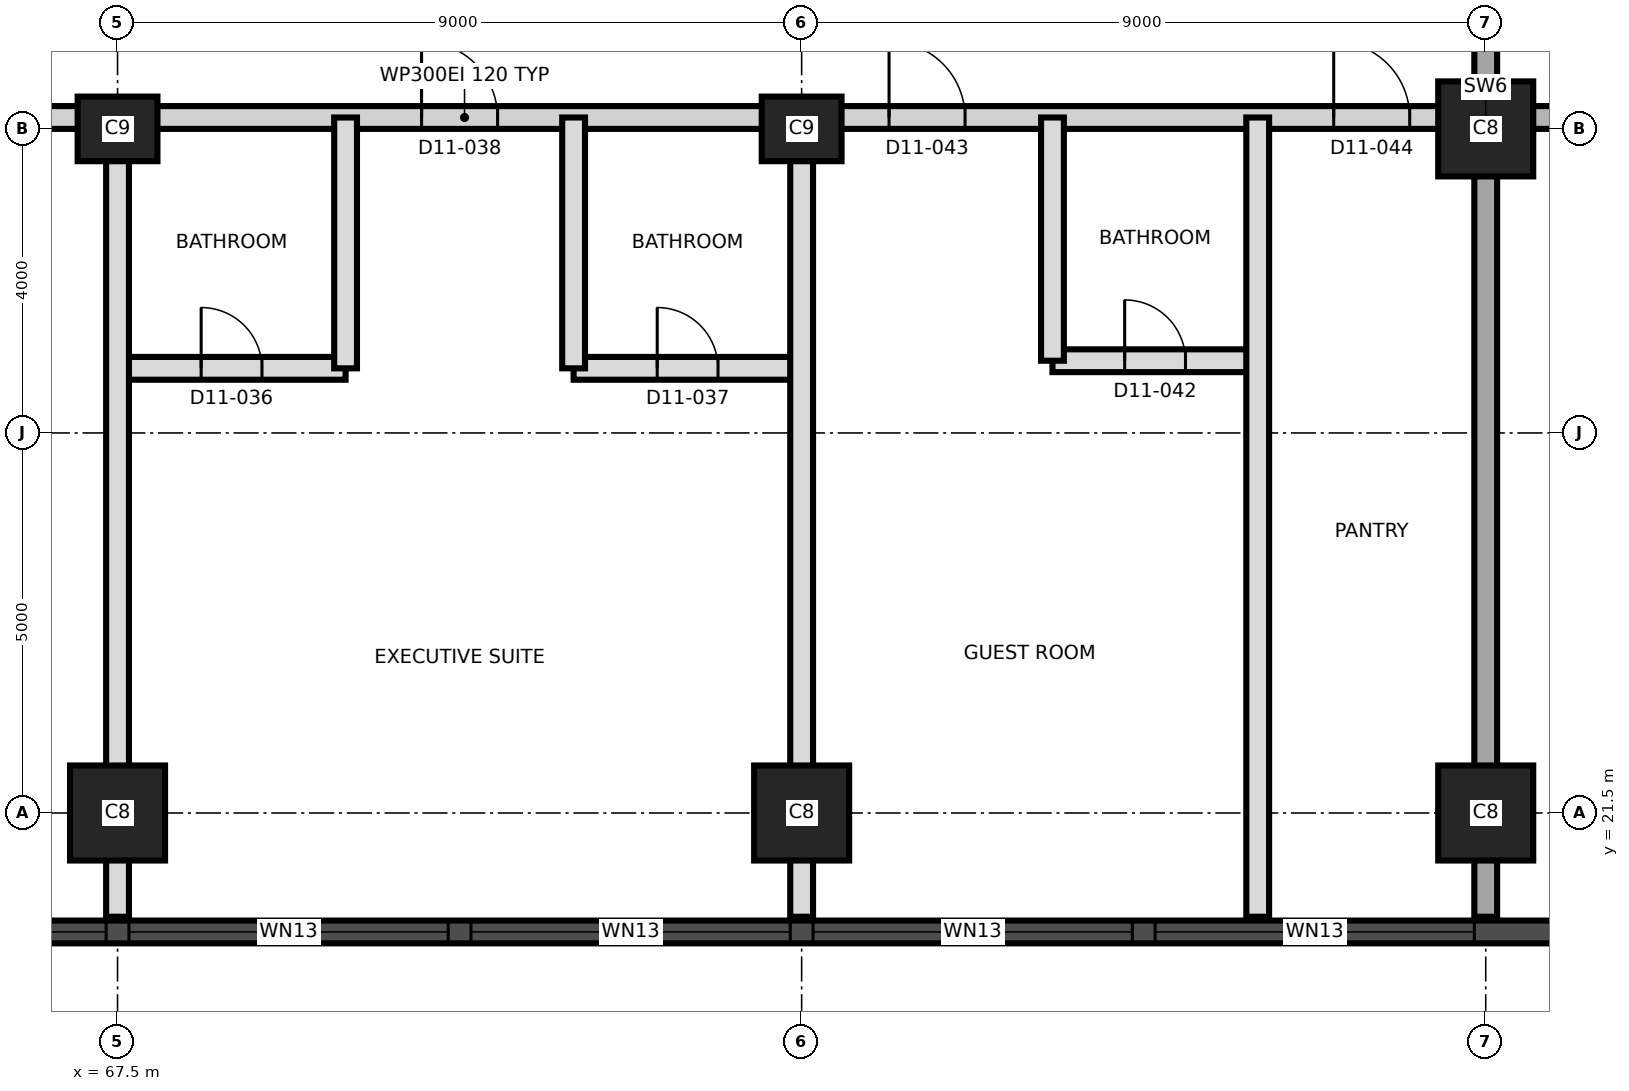
"""IFC4 building model, lengths in metres.
Left out: names, types, materials, properties, quantities, classifications, styles, units other than length and angle.
Written with IfcOpenShell. Run it as: python <this file> out.ifc"""

import sys

from ifc_helpers import new_model, si_unit, direction, frame, frame_2d, origin, origin_2d, place, context, subcontext, project, spatial, rectangle, extrude, element, fill, save


model = new_model("IFC4")
c1 = context("Model", 3, precision=1e-05, world=origin(), true_north=direction((0.0, 1.0)))
c2 = subcontext(c1, "Body", "Model", "MODEL_VIEW")
j1 = project(units=[si_unit("LENGTHUNIT", "METRE"), si_unit("PLANEANGLEUNIT", "RADIAN")], contexts=[c1])
p1 = place(None, origin())
s1 = spatial("IfcSite", under=j1, at=p1, CompositionType="ELEMENT")
p2 = place(p1, origin())
s2 = spatial("IfcBuilding", under=s1, at=p2, CompositionType="ELEMENT")
p3 = place(p2, frame((0.0, 0.0, 124.1)))
s3 = spatial("IfcBuildingStorey", under=s2, at=p3, CompositionType="ELEMENT", Elevation=124.1)
for number, where, z_axis, x_axis in (
    (1, (67.5, 21.5, 0.0), (0.0, 0.0, 1.0), (1.0, 0.0, 0.0)),
    (2, (76.5, 21.5, 0.0), (0.0, 0.0, 1.0), (1.0, 0.0, 0.0)),
    (3, (85.5, 21.5, 0.0), (0.0, 0.0, 1.0), (1.0, 0.0, 0.0)),
):
    element("IfcColumn", number, at=place(p3, frame(where, z_axis=z_axis, x_axis=x_axis)), inside=s3, PredefinedType="COLUMN", context=c2, shape_type="SweptSolid", body=[
        extrude(rectangle(XDim=1.25, YDim=1.25, at=origin_2d()), origin(), (0.0, 0.0, 1.0), 3.7),
    ])
for number, where, z_axis, x_axis in (
    (4, (67.5, 30.5, 0.0), (0.0, 0.0, 1.0), (1.0, 0.0, 0.0)),
    (5, (76.5, 30.5, 0.0), (0.0, 0.0, 1.0), (1.0, 0.0, 0.0)),
):
    element("IfcColumn", number, at=place(p3, frame(where, z_axis=z_axis, x_axis=x_axis)), inside=s3, PredefinedType="COLUMN", context=c2, shape_type="SweptSolid", body=[
        extrude(rectangle(XDim=1.05, YDim=0.85, at=origin_2d()), origin(), (0.0, 0.0, 1.0), 3.7),
    ])
p4 = place(p3, frame((85.5, 30.5, 0.0), z_axis=(0.0, 0.0, 1.0), x_axis=(1.0, 0.0, 0.0)))
e6 = element("IfcColumn", 6, at=p4, inside=s3, PredefinedType="COLUMN", context=c2, shape_type="SweptSolid", body=[
    extrude(rectangle(XDim=1.25, YDim=1.25, at=origin_2d()), origin(), (0.0, 0.0, 1.0), 3.7),
])
p5 = place(p3, frame((85.5, 20.135, 0.0), z_axis=(0.0, 0.0, 1.0), x_axis=(0.0, 1.0, 0.0)))
e7 = element("IfcWall", 7, at=p5, inside=s3, PredefinedType="SHEAR", context=c2, shape_type="SweptSolid", body=[
    extrude(rectangle(XDim=20.73, YDim=0.3, at=frame_2d((10.365, 0.0))), origin(), (0.0, 0.0, 1.0), 3.7),
])
p6 = place(p5, frame((11.565, 0.0, 0.0)))
e8 = element("IfcOpeningElement", 8, at=p6, cuts=e7, PredefinedType="OPENING", context=c2, shape_type="SweptSolid", body=[
    extrude(rectangle(XDim=1.4, YDim=2.1, at=frame_2d((0.7, 1.05))), frame((0.0, 0.16, 0.0), z_axis=(0.0, -1.0, 0.0), x_axis=(1.0, 0.0, 0.0)), (0.0, 0.0, 1.0), 0.32),
])
p7 = place(p3, frame((44.01, 19.935, 0.0), z_axis=(0.0, 0.0, 1.0), x_axis=(1.0, 0.0, 0.0)))
e9 = element("IfcWall", 9, at=p7, inside=s3, PredefinedType="SOLIDWALL", context=c2, shape_type="SweptSolid", body=[
    extrude(rectangle(XDim=43.477, YDim=0.3, at=frame_2d((21.738, 0.0))), origin(), (0.0, 0.0, 1.0), 3.4),
])
p8 = place(p7, frame((1.845, 0.0, 0.3)))
e10 = element("IfcOpeningElement", 10, at=p8, cuts=e9, PredefinedType="OPENING", context=c2, shape_type="SweptSolid", body=[
    extrude(rectangle(XDim=1.8, YDim=2.4, at=frame_2d((0.9, 1.2))), frame((0.0, 0.16, 0.0), z_axis=(0.0, -1.0, 0.0), x_axis=(1.0, 0.0, 0.0)), (0.0, 0.0, 1.0), 0.32),
])
p9 = place(p7, frame((5.64, 0.0, 0.9)))
e11 = element("IfcOpeningElement", 11, at=p9, cuts=e9, PredefinedType="OPENING", context=c2, shape_type="SweptSolid", body=[
    extrude(rectangle(XDim=4.2, YDim=1.7, at=frame_2d((2.1, 0.85))), frame((0.0, 0.16, 0.0), z_axis=(0.0, -1.0, 0.0), x_axis=(1.0, 0.0, 0.0)), (0.0, 0.0, 1.0), 0.32),
])
p10 = place(p7, frame((10.14, 0.0, 0.9)))
e12 = element("IfcOpeningElement", 12, at=p10, cuts=e9, PredefinedType="OPENING", context=c2, shape_type="SweptSolid", body=[
    extrude(rectangle(XDim=4.2, YDim=1.7, at=frame_2d((2.1, 0.85))), frame((0.0, 0.16, 0.0), z_axis=(0.0, -1.0, 0.0), x_axis=(1.0, 0.0, 0.0)), (0.0, 0.0, 1.0), 0.32),
])
p11 = place(p7, frame((14.64, 0.0, 0.9)))
e13 = element("IfcOpeningElement", 13, at=p11, cuts=e9, PredefinedType="OPENING", context=c2, shape_type="SweptSolid", body=[
    extrude(rectangle(XDim=4.2, YDim=1.7, at=frame_2d((2.1, 0.85))), frame((0.0, 0.16, 0.0), z_axis=(0.0, -1.0, 0.0), x_axis=(1.0, 0.0, 0.0)), (0.0, 0.0, 1.0), 0.32),
])
p12 = place(p7, frame((19.14, 0.0, 0.9)))
e14 = element("IfcOpeningElement", 14, at=p12, cuts=e9, PredefinedType="OPENING", context=c2, shape_type="SweptSolid", body=[
    extrude(rectangle(XDim=4.2, YDim=1.7, at=frame_2d((2.1, 0.85))), frame((0.0, 0.16, 0.0), z_axis=(0.0, -1.0, 0.0), x_axis=(1.0, 0.0, 0.0)), (0.0, 0.0, 1.0), 0.32),
])
p13 = place(p7, frame((23.64, 0.0, 0.9)))
e15 = element("IfcOpeningElement", 15, at=p13, cuts=e9, PredefinedType="OPENING", context=c2, shape_type="SweptSolid", body=[
    extrude(rectangle(XDim=4.2, YDim=1.7, at=frame_2d((2.1, 0.85))), frame((0.0, 0.16, 0.0), z_axis=(0.0, -1.0, 0.0), x_axis=(1.0, 0.0, 0.0)), (0.0, 0.0, 1.0), 0.32),
])
p14 = place(p7, frame((28.14, 0.0, 0.9)))
e16 = element("IfcOpeningElement", 16, at=p14, cuts=e9, PredefinedType="OPENING", context=c2, shape_type="SweptSolid", body=[
    extrude(rectangle(XDim=4.2, YDim=1.7, at=frame_2d((2.1, 0.85))), frame((0.0, 0.16, 0.0), z_axis=(0.0, -1.0, 0.0), x_axis=(1.0, 0.0, 0.0)), (0.0, 0.0, 1.0), 0.32),
])
p15 = place(p7, frame((32.64, 0.0, 0.9)))
e17 = element("IfcOpeningElement", 17, at=p15, cuts=e9, PredefinedType="OPENING", context=c2, shape_type="SweptSolid", body=[
    extrude(rectangle(XDim=4.2, YDim=1.7, at=frame_2d((2.1, 0.85))), frame((0.0, 0.16, 0.0), z_axis=(0.0, -1.0, 0.0), x_axis=(1.0, 0.0, 0.0)), (0.0, 0.0, 1.0), 0.32),
])
p16 = place(p7, frame((37.14, 0.0, 0.9)))
e18 = element("IfcOpeningElement", 18, at=p16, cuts=e9, PredefinedType="OPENING", context=c2, shape_type="SweptSolid", body=[
    extrude(rectangle(XDim=4.2, YDim=1.7, at=frame_2d((2.1, 0.85))), frame((0.0, 0.16, 0.0), z_axis=(0.0, -1.0, 0.0), x_axis=(1.0, 0.0, 0.0)), (0.0, 0.0, 1.0), 0.32),
])
p17 = place(p3, frame((67.5, 27.35, 0.0), z_axis=(0.0, 0.0, 1.0), x_axis=(1.0, 0.0, 0.0)))
e19 = element("IfcWall", 19, at=p17, inside=s3, PredefinedType="PARTITIONING", context=c2, shape_type="SweptSolid", body=[
    extrude(rectangle(XDim=3.0, YDim=0.3, at=frame_2d((1.5, 0.0))), origin(), (0.0, 0.0, 1.0), 3.4),
])
p18 = place(p17, frame((1.1, 0.0, 0.0)))
e20 = element("IfcOpeningElement", 20, at=p18, cuts=e19, PredefinedType="OPENING", context=c2, shape_type="SweptSolid", body=[
    extrude(rectangle(XDim=0.8, YDim=2.1, at=frame_2d((0.4, 1.05))), frame((0.0, 0.16, 0.0), z_axis=(0.0, -1.0, 0.0), x_axis=(1.0, 0.0, 0.0)), (0.0, 0.0, 1.0), 0.32),
])
p19 = place(p3, frame((73.5, 27.35, 0.0), z_axis=(0.0, 0.0, 1.0), x_axis=(1.0, 0.0, 0.0)))
e21 = element("IfcWall", 21, at=p19, inside=s3, PredefinedType="PARTITIONING", context=c2, shape_type="SweptSolid", body=[
    extrude(rectangle(XDim=3.0, YDim=0.3, at=frame_2d((1.5, 0.0))), origin(), (0.0, 0.0, 1.0), 3.4),
])
p20 = place(p19, frame((1.1, 0.0, 0.0)))
e22 = element("IfcOpeningElement", 22, at=p20, cuts=e21, PredefinedType="OPENING", context=c2, shape_type="SweptSolid", body=[
    extrude(rectangle(XDim=0.8, YDim=2.1, at=frame_2d((0.4, 1.05))), frame((0.0, 0.16, 0.0), z_axis=(0.0, -1.0, 0.0), x_axis=(1.0, 0.0, 0.0)), (0.0, 0.0, 1.0), 0.32),
])
p21 = place(p3, frame((79.8, 27.45, 0.0), z_axis=(0.0, 0.0, 1.0), x_axis=(1.0, 0.0, 0.0)))
e23 = element("IfcWall", 23, at=p21, inside=s3, PredefinedType="PARTITIONING", context=c2, shape_type="SweptSolid", body=[
    extrude(rectangle(XDim=2.7, YDim=0.3, at=frame_2d((1.35, 0.0))), origin(), (0.0, 0.0, 1.0), 3.4),
])
p22 = place(p21, frame((0.95, 0.0, 0.0)))
e24 = element("IfcOpeningElement", 24, at=p22, cuts=e23, PredefinedType="OPENING", context=c2, shape_type="SweptSolid", body=[
    extrude(rectangle(XDim=0.8, YDim=2.1, at=frame_2d((0.4, 1.05))), frame((0.0, 0.16, 0.0), z_axis=(0.0, -1.0, 0.0), x_axis=(1.0, 0.0, 0.0)), (0.0, 0.0, 1.0), 0.32),
])
p23 = place(p3, frame((58.8, 30.65, 0.0), z_axis=(0.0, 0.0, 1.0), x_axis=(1.0, 0.0, 0.0)))
e25 = element("IfcWall", 25, at=p23, inside=s3, PredefinedType="PARTITIONING", context=c2, shape_type="SweptSolid", body=[
    extrude(rectangle(XDim=26.53, YDim=0.3, at=frame_2d((13.265, 0.0))), origin(), (0.0, 0.0, 1.0), 3.4),
])
p24 = place(p23, frame((3.115, 0.0, 0.0)))
e26 = element("IfcOpeningElement", 26, at=p24, cuts=e25, PredefinedType="OPENING", context=c2, shape_type="SweptSolid", body=[
    extrude(rectangle(XDim=1.0, YDim=2.1, at=frame_2d((0.5, 1.05))), frame((0.0, 0.16, 0.0), z_axis=(0.0, -1.0, 0.0), x_axis=(1.0, 0.0, 0.0)), (0.0, 0.0, 1.0), 0.32),
])
p25 = place(p23, frame((6.065, 0.0, 0.0)))
e27 = element("IfcOpeningElement", 27, at=p25, cuts=e25, PredefinedType="OPENING", context=c2, shape_type="SweptSolid", body=[
    extrude(rectangle(XDim=1.4, YDim=2.1, at=frame_2d((0.7, 1.05))), frame((0.0, 0.16, 0.0), z_axis=(0.0, -1.0, 0.0), x_axis=(1.0, 0.0, 0.0)), (0.0, 0.0, 1.0), 0.32),
])
p26 = place(p23, frame((12.7, 0.0, 0.0)))
e28 = element("IfcOpeningElement", 28, at=p26, cuts=e25, PredefinedType="OPENING", context=c2, shape_type="SweptSolid", body=[
    extrude(rectangle(XDim=1.0, YDim=2.4, at=frame_2d((0.5, 1.2))), frame((0.0, 0.16, 0.0), z_axis=(0.0, -1.0, 0.0), x_axis=(1.0, 0.0, 0.0)), (0.0, 0.0, 1.0), 0.32),
])
p27 = place(p23, frame((18.85, 0.0, 0.0)))
e29 = element("IfcOpeningElement", 29, at=p27, cuts=e25, PredefinedType="OPENING", context=c2, shape_type="SweptSolid", body=[
    extrude(rectangle(XDim=1.0, YDim=2.1, at=frame_2d((0.5, 1.05))), frame((0.0, 0.16, 0.0), z_axis=(0.0, -1.0, 0.0), x_axis=(1.0, 0.0, 0.0)), (0.0, 0.0, 1.0), 0.32),
])
p28 = place(p23, frame((24.7, 0.0, 0.0)))
e30 = element("IfcOpeningElement", 30, at=p28, cuts=e25, PredefinedType="OPENING", context=c2, shape_type="SweptSolid", body=[
    extrude(rectangle(XDim=1.0, YDim=2.1, at=frame_2d((0.5, 1.05))), frame((0.0, 0.16, 0.0), z_axis=(0.0, -1.0, 0.0), x_axis=(1.0, 0.0, 0.0)), (0.0, 0.0, 1.0), 0.32),
])
p29 = place(p3, frame((85.67, 30.65, 0.0), z_axis=(0.0, 0.0, 1.0), x_axis=(1.0, 0.0, 0.0)))
e31 = element("IfcWall", 31, at=p29, inside=s3, PredefinedType="SHEAR", context=c2, shape_type="SweptSolid", body=[
    extrude(rectangle(XDim=9.58, YDim=0.3, at=frame_2d((4.79, 0.0))), origin(), (0.0, 0.0, 1.0), 3.4),
])
p30 = place(p29, frame((2.08, 0.0, 0.0)))
e32 = element("IfcOpeningElement", 32, at=p30, cuts=e31, PredefinedType="OPENING", context=c2, shape_type="SweptSolid", body=[
    extrude(rectangle(XDim=1.2, YDim=2.1, at=frame_2d((0.6, 1.05))), frame((0.0, 0.16, 0.0), z_axis=(0.0, -1.0, 0.0), x_axis=(1.0, 0.0, 0.0)), (0.0, 0.0, 1.0), 0.32),
])
p31 = place(p29, frame((5.63, 0.0, 0.0)))
e33 = element("IfcOpeningElement", 33, at=p31, cuts=e31, PredefinedType="OPENING", context=c2, shape_type="SweptSolid", body=[
    extrude(rectangle(XDim=1.0, YDim=2.1, at=frame_2d((0.5, 1.05))), frame((0.0, 0.16, 0.0), z_axis=(0.0, -1.0, 0.0), x_axis=(1.0, 0.0, 0.0)), (0.0, 0.0, 1.0), 0.32),
])
p32 = place(p3, frame((67.5, 20.135, 0.0), z_axis=(0.0, 0.0, 1.0), x_axis=(0.0, 1.0, 0.0)))
e34 = element("IfcWall", 34, at=p32, inside=s3, PredefinedType="PARTITIONING", context=c2, shape_type="SweptSolid", body=[
    extrude(rectangle(XDim=10.515, YDim=0.3, at=frame_2d((5.257, 0.0))), origin(), (0.0, 0.0, 1.0), 3.4),
])
for number, where, z_axis, x_axis in (
    (35, (70.5, 27.35, 0.0), (0.0, 0.0, 1.0), (0.0, 1.0, 0.0)),
    (36, (73.5, 27.35, 0.0), (0.0, 0.0, 1.0), (0.0, 1.0, 0.0)),
):
    element("IfcWall", number, at=place(p3, frame(where, z_axis=z_axis, x_axis=x_axis)), inside=s3, PredefinedType="PARTITIONING", context=c2, shape_type="SweptSolid", body=[
        extrude(rectangle(XDim=3.3, YDim=0.3, at=frame_2d((1.65, 0.0))), origin(), (0.0, 0.0, 1.0), 3.4),
    ])
p33 = place(p3, frame((76.5, 20.135, 0.0), z_axis=(0.0, 0.0, 1.0), x_axis=(0.0, 1.0, 0.0)))
e37 = element("IfcWall", 37, at=p33, inside=s3, PredefinedType="PARTITIONING", context=c2, shape_type="SweptSolid", body=[
    extrude(rectangle(XDim=10.515, YDim=0.3, at=frame_2d((5.257, 0.0))), origin(), (0.0, 0.0, 1.0), 3.4),
])
p34 = place(p3, frame((79.8, 27.45, 0.0), z_axis=(0.0, 0.0, 1.0), x_axis=(0.0, 1.0, 0.0)))
e38 = element("IfcWall", 38, at=p34, inside=s3, PredefinedType="PARTITIONING", context=c2, shape_type="SweptSolid", body=[
    extrude(rectangle(XDim=3.2, YDim=0.3, at=frame_2d((1.6, 0.0))), origin(), (0.0, 0.0, 1.0), 3.4),
])
p35 = place(p3, frame((82.5, 20.135, 0.0), z_axis=(0.0, 0.0, 1.0), x_axis=(0.0, 1.0, 0.0)))
e39 = element("IfcWall", 39, at=p35, inside=s3, PredefinedType="PARTITIONING", context=c2, shape_type="SweptSolid", body=[
    extrude(rectangle(XDim=10.515, YDim=0.3, at=frame_2d((5.257, 0.0))), origin(), (0.0, 0.0, 1.0), 3.4),
])
p36 = place(p12, origin())
e40 = element("IfcWindow", 40, at=p36, inside=s3, PartitioningType="SINGLE_PANEL", PredefinedType="WINDOW", context=c2, shape_type="SweptSolid", body=[
    extrude(rectangle(XDim=4.2, YDim=1.7, at=frame_2d((2.1, 0.85))), frame((0.0, 0.03, 0.0), z_axis=(0.0, -1.0, 0.0), x_axis=(1.0, 0.0, 0.0)), (0.0, 0.0, 1.0), 0.06),
])
fill(e14, e40)
p37 = place(p13, origin())
e41 = element("IfcWindow", 41, at=p37, inside=s3, PartitioningType="SINGLE_PANEL", PredefinedType="WINDOW", context=c2, shape_type="SweptSolid", body=[
    extrude(rectangle(XDim=4.2, YDim=1.7, at=frame_2d((2.1, 0.85))), frame((0.0, 0.03, 0.0), z_axis=(0.0, -1.0, 0.0), x_axis=(1.0, 0.0, 0.0)), (0.0, 0.0, 1.0), 0.06),
])
fill(e15, e41)
p38 = place(p14, origin())
e42 = element("IfcWindow", 42, at=p38, inside=s3, PartitioningType="SINGLE_PANEL", PredefinedType="WINDOW", context=c2, shape_type="SweptSolid", body=[
    extrude(rectangle(XDim=4.2, YDim=1.7, at=frame_2d((2.1, 0.85))), frame((0.0, 0.03, 0.0), z_axis=(0.0, -1.0, 0.0), x_axis=(1.0, 0.0, 0.0)), (0.0, 0.0, 1.0), 0.06),
])
fill(e16, e42)
p39 = place(p15, origin())
e43 = element("IfcWindow", 43, at=p39, inside=s3, PartitioningType="SINGLE_PANEL", PredefinedType="WINDOW", context=c2, shape_type="SweptSolid", body=[
    extrude(rectangle(XDim=4.2, YDim=1.7, at=frame_2d((2.1, 0.85))), frame((0.0, 0.03, 0.0), z_axis=(0.0, -1.0, 0.0), x_axis=(1.0, 0.0, 0.0)), (0.0, 0.0, 1.0), 0.06),
])
fill(e17, e43)
p40 = place(p16, origin())
e44 = element("IfcWindow", 44, at=p40, inside=s3, PartitioningType="SINGLE_PANEL", PredefinedType="WINDOW", context=c2, shape_type="SweptSolid", body=[
    extrude(rectangle(XDim=4.2, YDim=1.7, at=frame_2d((2.1, 0.85))), frame((0.0, 0.03, 0.0), z_axis=(0.0, -1.0, 0.0), x_axis=(1.0, 0.0, 0.0)), (0.0, 0.0, 1.0), 0.06),
])
fill(e18, e44)
p41 = place(p18, origin())
e45 = element("IfcDoor", 45, at=p41, inside=s3, OperationType="SINGLE_SWING_LEFT", PredefinedType="DOOR", context=c2, shape_type="SweptSolid", body=[
    extrude(rectangle(XDim=0.8, YDim=2.1, at=frame_2d((0.4, 1.05))), frame((0.0, 0.025, 0.0), z_axis=(0.0, -1.0, 0.0), x_axis=(1.0, 0.0, 0.0)), (0.0, 0.0, 1.0), 0.05),
])
fill(e20, e45)
p42 = place(p20, origin())
e46 = element("IfcDoor", 46, at=p42, inside=s3, OperationType="SINGLE_SWING_RIGHT", PredefinedType="DOOR", context=c2, shape_type="SweptSolid", body=[
    extrude(rectangle(XDim=0.8, YDim=2.1, at=frame_2d((0.4, 1.05))), frame((0.0, 0.025, 0.0), z_axis=(0.0, -1.0, 0.0), x_axis=(1.0, 0.0, 0.0)), (0.0, 0.0, 1.0), 0.05),
])
fill(e22, e46)
p43 = place(p26, origin())
e47 = element("IfcDoor", 47, at=p43, inside=s3, OperationType="SINGLE_SWING_LEFT", PredefinedType="DOOR", context=c2, shape_type="SweptSolid", body=[
    extrude(rectangle(XDim=1.0, YDim=2.4, at=frame_2d((0.5, 1.2))), frame((0.0, 0.025, 0.0), z_axis=(0.0, -1.0, 0.0), x_axis=(1.0, 0.0, 0.0)), (0.0, 0.0, 1.0), 0.05),
])
fill(e28, e47)
p44 = place(p22, origin())
e48 = element("IfcDoor", 48, at=p44, inside=s3, OperationType="SINGLE_SWING_LEFT", PredefinedType="DOOR", context=c2, shape_type="SweptSolid", body=[
    extrude(rectangle(XDim=0.8, YDim=2.1, at=frame_2d((0.4, 1.05))), frame((0.0, 0.025, 0.0), z_axis=(0.0, -1.0, 0.0), x_axis=(1.0, 0.0, 0.0)), (0.0, 0.0, 1.0), 0.05),
])
fill(e24, e48)
p45 = place(p27, origin())
e49 = element("IfcDoor", 49, at=p45, inside=s3, OperationType="SINGLE_SWING_LEFT", PredefinedType="DOOR", context=c2, shape_type="SweptSolid", body=[
    extrude(rectangle(XDim=1.0, YDim=2.1, at=frame_2d((0.5, 1.05))), frame((0.0, 0.025, 0.0), z_axis=(0.0, -1.0, 0.0), x_axis=(1.0, 0.0, 0.0)), (0.0, 0.0, 1.0), 0.05),
])
fill(e29, e49)
p46 = place(p28, origin())
e50 = element("IfcDoor", 50, at=p46, inside=s3, OperationType="SINGLE_SWING_RIGHT", PredefinedType="DOOR", context=c2, shape_type="SweptSolid", body=[
    extrude(rectangle(XDim=1.0, YDim=2.1, at=frame_2d((0.5, 1.05))), frame((0.0, 0.025, 0.0), z_axis=(0.0, -1.0, 0.0), x_axis=(1.0, 0.0, 0.0)), (0.0, 0.0, 1.0), 0.05),
])
fill(e30, e50)
save(model, sys.argv[1])
